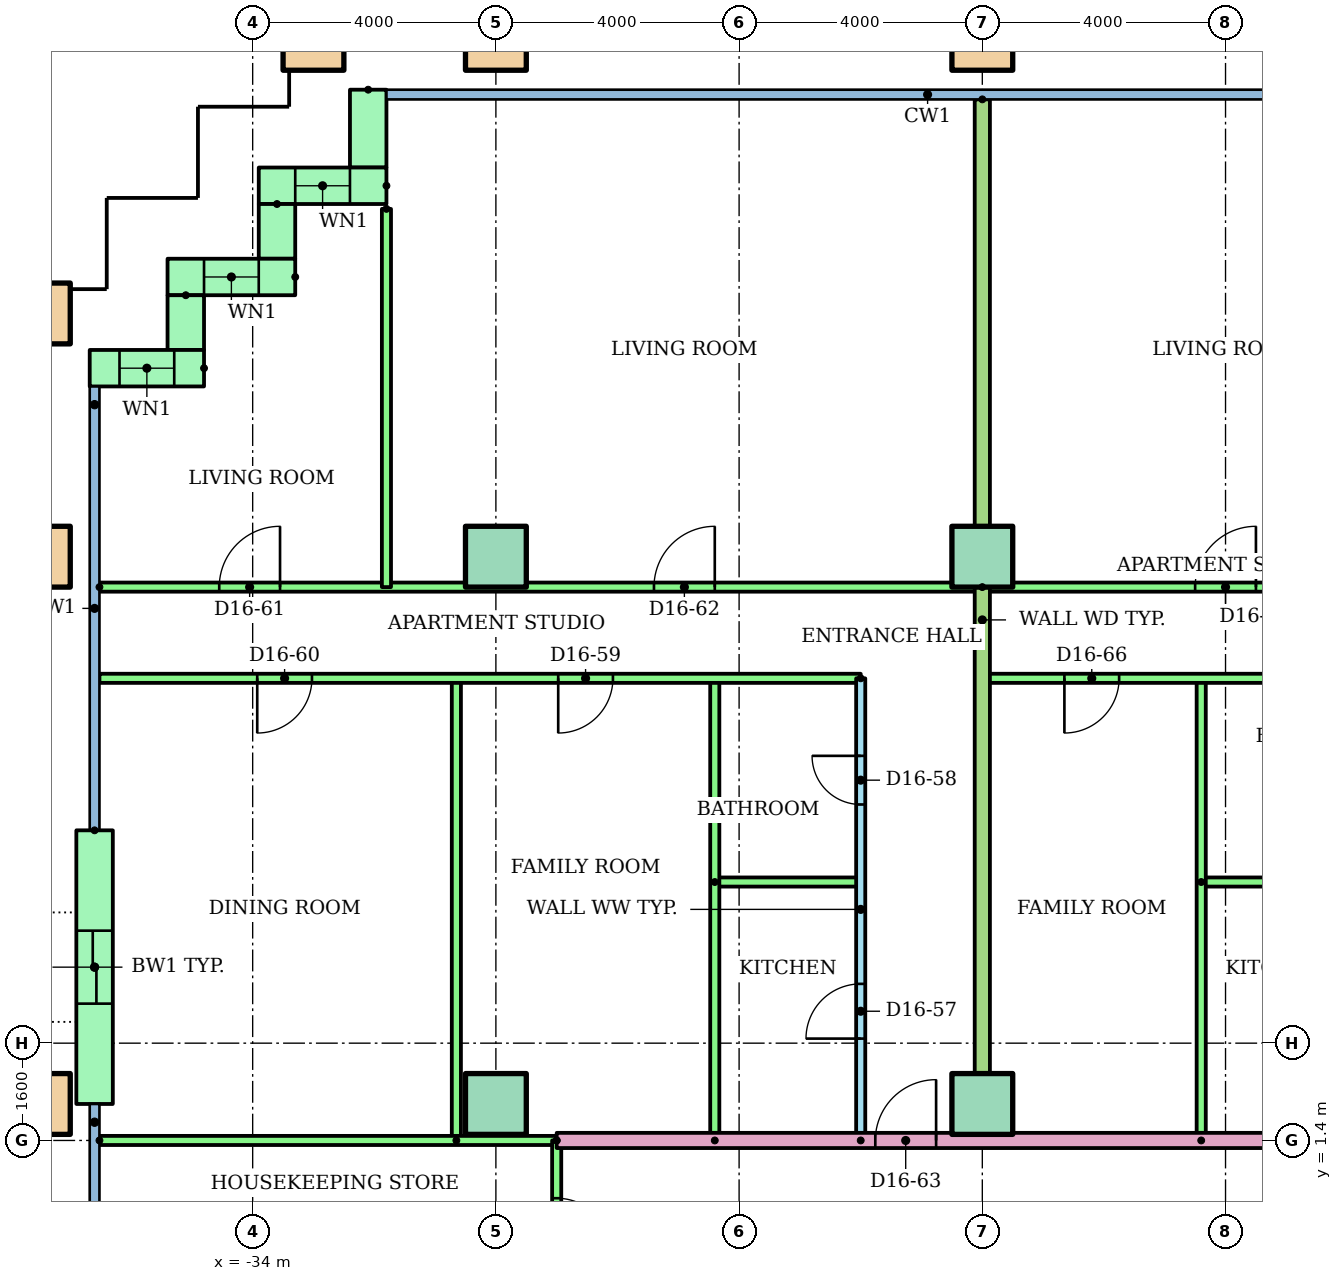
"""IFC4 building model, lengths in metres.
Left out: names, types, materials, properties, quantities, classifications, styles, units other than length and angle.
Written with IfcOpenShell. Run it as: python <this file> out.ifc"""

import sys

from ifc_helpers import new_model, si_unit, direction, frame, frame_2d, origin, origin_2d, place, context, subcontext, project, spatial, rectangle, hollow_rectangle, extrude, element, fill, save


model = new_model("IFC4")
c1 = context("Model", 3, precision=1e-05, world=origin(), true_north=direction((0.0, 1.0)))
c2 = subcontext(c1, "Body", "Model", "MODEL_VIEW")
j1 = project(units=[si_unit("LENGTHUNIT", "METRE"), si_unit("PLANEANGLEUNIT", "RADIAN")], contexts=[c1])
p1 = place(None, origin())
s1 = spatial("IfcSite", under=j1, at=p1, CompositionType="ELEMENT")
p2 = place(p1, origin())
s2 = spatial("IfcBuilding", under=s1, at=p2, CompositionType="ELEMENT")
p3 = place(p2, frame((0.0, 0.0, 60.8)))
s3 = spatial("IfcBuildingStorey", under=s2, at=p3, CompositionType="ELEMENT", Elevation=60.8)
p4 = place(p3, frame((-37.5, 2.0, 0.0)))
e1 = element("IfcColumn", 1, at=p4, inside=s3, PredefinedType="COLUMN", context=c2, shape_type="SweptSolid", body=[
    extrude(hollow_rectangle(XDim=1.0, YDim=1.0, WallThickness=0.05, at=origin_2d()), origin(), (0.0, 0.0, 1.0), 3.2),
])
for number, where in (
    (2, (-30.0, 2.0, 0.0)),
    (3, (-22.0, 2.0, 0.0)),
):
    element("IfcColumn", number, at=place(p3, frame(where)), inside=s3, PredefinedType="COLUMN", context=c2, shape_type="SweptSolid", body=[
        extrude(rectangle(XDim=1.0, YDim=1.0, at=origin_2d()), origin(), (0.0, 0.0, 1.0), 3.2),
    ])
p5 = place(p3, frame((-37.5, 11.0, 0.0)))
e4 = element("IfcColumn", 4, at=p5, inside=s3, PredefinedType="COLUMN", context=c2, shape_type="SweptSolid", body=[
    extrude(hollow_rectangle(XDim=1.0, YDim=1.0, WallThickness=0.05, at=origin_2d()), origin(), (0.0, 0.0, 1.0), 3.2),
])
for number, where in (
    (5, (-30.0, 11.0, 0.0)),
    (6, (-22.0, 11.0, 0.0)),
):
    element("IfcColumn", number, at=place(p3, frame(where)), inside=s3, PredefinedType="COLUMN", context=c2, shape_type="SweptSolid", body=[
        extrude(rectangle(XDim=1.0, YDim=1.0, at=origin_2d()), origin(), (0.0, 0.0, 1.0), 3.2),
    ])
for number, where in (
    (7, (-37.5, 15.0, 0.0)),
    (8, (-33.0, 19.5, 0.0)),
    (9, (-30.0, 19.5, 0.0)),
    (10, (-22.0, 19.5, 0.0)),
):
    element("IfcColumn", number, at=place(p3, frame(where)), inside=s3, PredefinedType="COLUMN", context=c2, shape_type="SweptSolid", body=[
        extrude(hollow_rectangle(XDim=1.0, YDim=1.0, WallThickness=0.05, at=origin_2d()), origin(), (0.0, 0.0, 1.0), 3.2),
    ])
p6 = place(p3, frame((-32.1, 18.68, 0.0), z_axis=(0.0, 0.0, 1.0), x_axis=(0.0, -1.0, 0.0)))
e11 = element("IfcWall", 11, at=p6, inside=s3, PredefinedType="STANDARD", context=c2, shape_type="SweptSolid", body=[
    extrude(rectangle(XDim=1.28, YDim=0.6, at=frame_2d((0.64, 0.0))), origin(), (0.0, 0.0, 1.0), 2.8),
])
p7 = place(p3, frame((-31.8, 17.1, 0.0), z_axis=(0.0, 0.0, 1.0), x_axis=(-1.0, 0.0, 0.0)))
e12 = element("IfcWall", 12, at=p7, inside=s3, PredefinedType="STANDARD", context=c2, shape_type="SweptSolid", body=[
    extrude(rectangle(XDim=2.1, YDim=0.6, at=frame_2d((1.05, 0.0))), origin(), (0.0, 0.0, 1.0), 2.8),
])
p8 = place(p7, frame((0.6, 0.0, 0.9)))
e13 = element("IfcOpeningElement", 13, at=p8, cuts=e12, PredefinedType="OPENING", context=c2, shape_type="SweptSolid", body=[
    extrude(rectangle(XDim=0.9, YDim=1.5, at=frame_2d((0.45, 0.75))), frame((0.0, 0.31, 0.0), z_axis=(0.0, -1.0, 0.0), x_axis=(1.0, 0.0, 0.0)), (0.0, 0.0, 1.0), 0.62),
])
p9 = place(p3, frame((-33.6, 16.8, 0.0), z_axis=(0.0, 0.0, 1.0), x_axis=(0.0, -1.0, 0.0)))
e14 = element("IfcWall", 14, at=p9, inside=s3, PredefinedType="STANDARD", context=c2, shape_type="SweptSolid", body=[
    extrude(rectangle(XDim=0.9, YDim=0.6, at=frame_2d((0.45, 0.0))), origin(), (0.0, 0.0, 1.0), 2.8),
])
p10 = place(p3, frame((-33.3, 15.6, 0.0), z_axis=(0.0, 0.0, 1.0), x_axis=(-1.0, 0.0, 0.0)))
e15 = element("IfcWall", 15, at=p10, inside=s3, PredefinedType="STANDARD", context=c2, shape_type="SweptSolid", body=[
    extrude(rectangle(XDim=2.1, YDim=0.6, at=frame_2d((1.05, 0.0))), origin(), (0.0, 0.0, 1.0), 2.8),
])
p11 = place(p10, frame((0.6, 0.0, 0.9)))
e16 = element("IfcOpeningElement", 16, at=p11, cuts=e15, PredefinedType="OPENING", context=c2, shape_type="SweptSolid", body=[
    extrude(rectangle(XDim=0.9, YDim=1.5, at=frame_2d((0.45, 0.75))), frame((0.0, 0.31, 0.0), z_axis=(0.0, -1.0, 0.0), x_axis=(1.0, 0.0, 0.0)), (0.0, 0.0, 1.0), 0.62),
])
p12 = place(p3, frame((-35.1, 15.3, 0.0), z_axis=(0.0, 0.0, 1.0), x_axis=(0.0, -1.0, 0.0)))
e17 = element("IfcWall", 17, at=p12, inside=s3, PredefinedType="STANDARD", context=c2, shape_type="SweptSolid", body=[
    extrude(rectangle(XDim=0.9, YDim=0.6, at=frame_2d((0.45, 0.0))), origin(), (0.0, 0.0, 1.0), 2.8),
])
p13 = place(p3, frame((-34.8, 14.1, 0.0), z_axis=(0.0, 0.0, 1.0), x_axis=(-1.0, 0.0, 0.0)))
e18 = element("IfcWall", 18, at=p13, inside=s3, PredefinedType="STANDARD", context=c2, shape_type="SweptSolid", body=[
    extrude(rectangle(XDim=1.88, YDim=0.6, at=frame_2d((0.94, 0.0))), origin(), (0.0, 0.0, 1.0), 2.8),
])
p14 = place(p13, frame((0.49, 0.0, 0.9)))
e19 = element("IfcOpeningElement", 19, at=p14, cuts=e18, PredefinedType="OPENING", context=c2, shape_type="SweptSolid", body=[
    extrude(rectangle(XDim=0.9, YDim=1.5, at=frame_2d((0.45, 0.75))), frame((0.0, 0.31, 0.0), z_axis=(0.0, -1.0, 0.0), x_axis=(1.0, 0.0, 0.0)), (0.0, 0.0, 1.0), 0.62),
])
p15 = place(p3, frame((-36.6, 6.5, 0.0), z_axis=(0.0, 0.0, 1.0), x_axis=(0.0, -1.0, 0.0)))
e20 = element("IfcWall", 20, at=p15, inside=s3, PredefinedType="STANDARD", context=c2, shape_type="SweptSolid", body=[
    extrude(rectangle(XDim=4.5, YDim=0.6, at=frame_2d((2.25, 0.0))), origin(), (0.0, 0.0, 1.0), 2.8),
])
p16 = place(p15, frame((1.65, 0.0, 0.0)))
e21 = element("IfcOpeningElement", 21, at=p16, cuts=e20, PredefinedType="OPENING", context=c2, shape_type="SweptSolid", body=[
    extrude(rectangle(XDim=1.2, YDim=2.1, at=frame_2d((0.6, 1.05))), frame((0.0, 0.31, 0.0), z_axis=(0.0, -1.0, 0.0), x_axis=(1.0, 0.0, 0.0)), (0.0, 0.0, 1.0), 0.62),
])
p17 = place(p3, frame((-24.0, 1.4, 0.0), z_axis=(0.0, 0.0, 1.0), x_axis=(0.0, 1.0, 0.0)))
e22 = element("IfcWall", 22, at=p17, inside=s3, PredefinedType="PARTITIONING", context=c2, shape_type="SweptSolid", body=[
    extrude(rectangle(XDim=7.6, YDim=0.15, at=frame_2d((3.8, 0.0))), origin(), (0.0, 0.0, 1.0), 2.4),
])
p18 = place(p17, frame((1.675, 0.0, 0.0)))
e23 = element("IfcOpeningElement", 23, at=p18, cuts=e22, PredefinedType="OPENING", context=c2, shape_type="SweptSolid", body=[
    extrude(rectangle(XDim=0.9, YDim=2.1, at=frame_2d((0.45, 1.05))), frame((0.0, 0.085, 0.0), z_axis=(0.0, -1.0, 0.0), x_axis=(1.0, 0.0, 0.0)), (0.0, 0.0, 1.0), 0.17),
])
p19 = place(p17, frame((5.525, 0.0, 0.0)))
e24 = element("IfcOpeningElement", 24, at=p19, cuts=e22, PredefinedType="OPENING", context=c2, shape_type="SweptSolid", body=[
    extrude(rectangle(XDim=0.8, YDim=2.1, at=frame_2d((0.4, 1.05))), frame((0.0, 0.085, 0.0), z_axis=(0.0, -1.0, 0.0), x_axis=(1.0, 0.0, 0.0)), (0.0, 0.0, 1.0), 0.17),
])
p20 = place(p3, frame((-26.4, 5.65, 0.0)))
e25 = element("IfcWall", 25, at=p20, inside=s3, PredefinedType="PARTITIONING", context=c2, shape_type="SweptSolid", body=[
    extrude(rectangle(XDim=2.4, YDim=0.15, at=frame_2d((1.2, 0.0))), origin(), (0.0, 0.0, 1.0), 2.4),
])
for number, where, z_axis, x_axis in (
    (26, (-26.4, 1.4, 0.0), (0.0, 0.0, 1.0), (0.0, 1.0, 0.0)),
    (27, (-30.65, 1.4, 0.0), (0.0, 0.0, 1.0), (0.0, 1.0, 0.0)),
):
    element("IfcWall", number, at=place(p3, frame(where, z_axis=z_axis, x_axis=x_axis)), inside=s3, PredefinedType="PARTITIONING", context=c2, shape_type="SweptSolid", body=[
        extrude(rectangle(XDim=7.6, YDim=0.15, at=frame_2d((3.8, 0.0))), origin(), (0.0, 0.0, 1.0), 2.4),
    ])
p21 = place(p3, frame((-24.0, 9.0, 0.0), z_axis=(0.0, 0.0, 1.0), x_axis=(-1.0, 0.0, 0.0)))
e28 = element("IfcWall", 28, at=p21, inside=s3, PredefinedType="PARTITIONING", context=c2, shape_type="SweptSolid", body=[
    extrude(rectangle(XDim=12.52, YDim=0.15, at=frame_2d((6.26, 0.0))), origin(), (0.0, 0.0, 1.0), 2.4),
])
p22 = place(p21, frame((4.075, 0.0, 0.0)))
e29 = element("IfcOpeningElement", 29, at=p22, cuts=e28, PredefinedType="OPENING", context=c2, shape_type="SweptSolid", body=[
    extrude(rectangle(XDim=0.9, YDim=2.1, at=frame_2d((0.45, 1.05))), frame((0.0, 0.085, 0.0), z_axis=(0.0, -1.0, 0.0), x_axis=(1.0, 0.0, 0.0)), (0.0, 0.0, 1.0), 0.17),
])
p23 = place(p21, frame((9.025, 0.0, 0.0)))
e30 = element("IfcOpeningElement", 30, at=p23, cuts=e28, PredefinedType="OPENING", context=c2, shape_type="SweptSolid", body=[
    extrude(rectangle(XDim=0.9, YDim=2.1, at=frame_2d((0.45, 1.05))), frame((0.0, 0.085, 0.0), z_axis=(0.0, -1.0, 0.0), x_axis=(1.0, 0.0, 0.0)), (0.0, 0.0, 1.0), 0.17),
])
p24 = place(p3, frame((-36.52, 10.5, 0.0)))
e31 = element("IfcWall", 31, at=p24, inside=s3, PredefinedType="PARTITIONING", context=c2, shape_type="SweptSolid", body=[
    extrude(rectangle(XDim=14.52, YDim=0.15, at=frame_2d((7.26, 0.0))), origin(), (0.0, 0.0, 1.0), 2.4),
])
p25 = place(p24, frame((1.97, 0.0, 0.0)))
e32 = element("IfcOpeningElement", 32, at=p25, cuts=e31, PredefinedType="OPENING", context=c2, shape_type="SweptSolid", body=[
    extrude(rectangle(XDim=1.0, YDim=2.1, at=frame_2d((0.5, 1.05))), frame((0.0, 0.085, 0.0), z_axis=(0.0, -1.0, 0.0), x_axis=(1.0, 0.0, 0.0)), (0.0, 0.0, 1.0), 0.17),
])
p26 = place(p24, frame((9.12, 0.0, 0.0)))
e33 = element("IfcOpeningElement", 33, at=p26, cuts=e31, PredefinedType="OPENING", context=c2, shape_type="SweptSolid", body=[
    extrude(rectangle(XDim=1.0, YDim=2.1, at=frame_2d((0.5, 1.05))), frame((0.0, 0.085, 0.0), z_axis=(0.0, -1.0, 0.0), x_axis=(1.0, 0.0, 0.0)), (0.0, 0.0, 1.0), 0.17),
])
p27 = place(p3, frame((-31.8, 16.72, 0.0), z_axis=(0.0, 0.0, 1.0), x_axis=(0.0, -1.0, 0.0)))
e34 = element("IfcWall", 34, at=p27, inside=s3, PredefinedType="PARTITIONING", context=c2, shape_type="SweptSolid", body=[
    extrude(rectangle(XDim=6.22, YDim=0.15, at=frame_2d((3.11, 0.0))), origin(), (0.0, 0.0, 1.0), 2.4),
])
p28 = place(p3, frame((-18.4, 5.65, 0.0)))
e35 = element("IfcWall", 35, at=p28, inside=s3, PredefinedType="PARTITIONING", context=c2, shape_type="SweptSolid", body=[
    extrude(rectangle(XDim=2.4, YDim=0.15, at=frame_2d((1.2, 0.0))), origin(), (0.0, 0.0, 1.0), 2.4),
])
p29 = place(p3, frame((-18.4, 1.4, 0.0), z_axis=(0.0, 0.0, 1.0), x_axis=(0.0, 1.0, 0.0)))
e36 = element("IfcWall", 36, at=p29, inside=s3, PredefinedType="PARTITIONING", context=c2, shape_type="SweptSolid", body=[
    extrude(rectangle(XDim=7.6, YDim=0.15, at=frame_2d((3.8, 0.0))), origin(), (0.0, 0.0, 1.0), 2.4),
])
p30 = place(p3, frame((-16.0, 9.0, 0.0), z_axis=(0.0, 0.0, 1.0), x_axis=(-1.0, 0.0, 0.0)))
e37 = element("IfcWall", 37, at=p30, inside=s3, PredefinedType="PARTITIONING", context=c2, shape_type="SweptSolid", body=[
    extrude(rectangle(XDim=6.0, YDim=0.15, at=frame_2d((3.0, 0.0))), origin(), (0.0, 0.0, 1.0), 2.4),
])
p31 = place(p30, frame((3.75, 0.0, 0.0)))
e38 = element("IfcOpeningElement", 38, at=p31, cuts=e37, PredefinedType="OPENING", context=c2, shape_type="SweptSolid", body=[
    extrude(rectangle(XDim=0.9, YDim=2.1, at=frame_2d((0.45, 1.05))), frame((0.0, 0.085, 0.0), z_axis=(0.0, -1.0, 0.0), x_axis=(1.0, 0.0, 0.0)), (0.0, 0.0, 1.0), 0.17),
])
p32 = place(p3, frame((-22.0, 10.5, 0.0)))
e39 = element("IfcWall", 39, at=p32, inside=s3, PredefinedType="PARTITIONING", context=c2, shape_type="SweptSolid", body=[
    extrude(rectangle(XDim=8.0, YDim=0.15, at=frame_2d((4.0, 0.0))), origin(), (0.0, 0.0, 1.0), 2.4),
])
p33 = place(p32, frame((3.5, 0.0, 0.0)))
e40 = element("IfcOpeningElement", 40, at=p33, cuts=e39, PredefinedType="OPENING", context=c2, shape_type="SweptSolid", body=[
    extrude(rectangle(XDim=1.0, YDim=2.1, at=frame_2d((0.5, 1.05))), frame((0.0, 0.085, 0.0), z_axis=(0.0, -1.0, 0.0), x_axis=(1.0, 0.0, 0.0)), (0.0, 0.0, 1.0), 0.17),
])
p34 = place(p3, frame((-22.0, 18.521, 0.0), z_axis=(0.0, 0.0, 1.0), x_axis=(0.0, -1.0, 0.0)))
e41 = element("IfcWall", 41, at=p34, inside=s3, PredefinedType="PARTITIONING", context=c2, shape_type="SweptSolid", body=[
    extrude(rectangle(XDim=17.121, YDim=0.25, at=frame_2d((8.561, 0.0))), origin(), (0.0, 0.0, 1.0), 2.4),
])
p35 = place(p3, frame((-29.0, 1.4, 0.0)))
e42 = element("IfcWall", 42, at=p35, inside=s3, PredefinedType="PARTITIONING", context=c2, shape_type="SweptSolid", body=[
    extrude(rectangle(XDim=15.0, YDim=0.25, at=frame_2d((7.5, 0.0))), origin(), (0.0, 0.0, 1.0), 2.4),
])
p36 = place(p35, frame((5.24, 0.0, 0.0)))
e43 = element("IfcOpeningElement", 43, at=p36, cuts=e42, PredefinedType="OPENING", context=c2, shape_type="SweptSolid", body=[
    extrude(rectangle(XDim=1.0, YDim=2.1, at=frame_2d((0.5, 1.05))), frame((0.0, 0.135, 0.0), z_axis=(0.0, -1.0, 0.0), x_axis=(1.0, 0.0, 0.0)), (0.0, 0.0, 1.0), 0.27),
])
p37 = place(p35, frame((13.5, 0.0, 0.0)))
e44 = element("IfcOpeningElement", 44, at=p37, cuts=e42, PredefinedType="OPENING", context=c2, shape_type="SweptSolid", body=[
    extrude(rectangle(XDim=1.0, YDim=2.1, at=frame_2d((0.5, 1.05))), frame((0.0, 0.135, 0.0), z_axis=(0.0, -1.0, 0.0), x_axis=(1.0, 0.0, 0.0)), (0.0, 0.0, 1.0), 0.27),
])
p38 = place(p3, frame((-36.52, 1.4, 0.0)))
e45 = element("IfcWall", 45, at=p38, inside=s3, PredefinedType="PARTITIONING", context=c2, shape_type="SweptSolid", body=[
    extrude(rectangle(XDim=7.52, YDim=0.15, at=frame_2d((3.76, 0.0))), origin(), (0.0, 0.0, 1.0), 2.4),
])
p39 = place(p3, frame((-29.0, 1.4, 0.0), z_axis=(0.0, 0.0, 1.0), x_axis=(0.0, -1.0, 0.0)))
e46 = element("IfcWall", 46, at=p39, inside=s3, PredefinedType="PARTITIONING", context=c2, shape_type="SweptSolid", body=[
    extrude(rectangle(XDim=2.8, YDim=0.15, at=frame_2d((1.4, 0.0))), origin(), (0.0, 0.0, 1.0), 2.4),
])
p40 = place(p39, frame((0.95, 0.0, 0.0)))
e47 = element("IfcOpeningElement", 47, at=p40, cuts=e46, PredefinedType="OPENING", context=c2, shape_type="SweptSolid", body=[
    extrude(rectangle(XDim=0.9, YDim=2.1, at=frame_2d((0.45, 1.05))), frame((0.0, 0.085, 0.0), z_axis=(0.0, -1.0, 0.0), x_axis=(1.0, 0.0, 0.0)), (0.0, 0.0, 1.0), 0.17),
])
p41 = place(p8, origin())
e48 = element("IfcWindow", 48, at=p41, inside=s3, PartitioningType="SINGLE_PANEL", PredefinedType="WINDOW", context=c2, shape_type="SweptSolid", body=[
    extrude(rectangle(XDim=0.9, YDim=1.5, at=frame_2d((0.45, 0.75))), frame((0.0, 0.03, 0.0), z_axis=(0.0, -1.0, 0.0), x_axis=(1.0, 0.0, 0.0)), (0.0, 0.0, 1.0), 0.06),
])
fill(e13, e48)
p42 = place(p11, origin())
e49 = element("IfcWindow", 49, at=p42, inside=s3, PartitioningType="SINGLE_PANEL", PredefinedType="WINDOW", context=c2, shape_type="SweptSolid", body=[
    extrude(rectangle(XDim=0.9, YDim=1.5, at=frame_2d((0.45, 0.75))), frame((0.0, 0.03, 0.0), z_axis=(0.0, -1.0, 0.0), x_axis=(1.0, 0.0, 0.0)), (0.0, 0.0, 1.0), 0.06),
])
fill(e16, e49)
p43 = place(p14, origin())
e50 = element("IfcWindow", 50, at=p43, inside=s3, PartitioningType="SINGLE_PANEL", PredefinedType="WINDOW", context=c2, shape_type="SweptSolid", body=[
    extrude(rectangle(XDim=0.9, YDim=1.5, at=frame_2d((0.45, 0.75))), frame((0.0, 0.03, 0.0), z_axis=(0.0, -1.0, 0.0), x_axis=(1.0, 0.0, 0.0)), (0.0, 0.0, 1.0), 0.06),
])
fill(e19, e50)
p44 = place(p18, origin())
e51 = element("IfcDoor", 51, at=p44, inside=s3, OperationType="SINGLE_SWING_LEFT", PredefinedType="DOOR", context=c2, shape_type="SweptSolid", body=[
    extrude(rectangle(XDim=0.9, YDim=2.1, at=frame_2d((0.45, 1.05))), frame((0.0, 0.025, 0.0), z_axis=(0.0, -1.0, 0.0), x_axis=(1.0, 0.0, 0.0)), (0.0, 0.0, 1.0), 0.05),
])
fill(e23, e51)
p45 = place(p19, origin())
e52 = element("IfcDoor", 52, at=p45, inside=s3, OperationType="SINGLE_SWING_RIGHT", PredefinedType="DOOR", context=c2, shape_type="SweptSolid", body=[
    extrude(rectangle(XDim=0.8, YDim=2.1, at=frame_2d((0.4, 1.05))), frame((0.0, 0.025, 0.0), z_axis=(0.0, -1.0, 0.0), x_axis=(1.0, 0.0, 0.0)), (0.0, 0.0, 1.0), 0.05),
])
fill(e24, e52)
p46 = place(p22, origin())
e53 = element("IfcDoor", 53, at=p46, inside=s3, OperationType="SINGLE_SWING_RIGHT", PredefinedType="DOOR", context=c2, shape_type="SweptSolid", body=[
    extrude(rectangle(XDim=0.9, YDim=2.1, at=frame_2d((0.45, 1.05))), frame((0.0, 0.025, 0.0), z_axis=(0.0, -1.0, 0.0), x_axis=(1.0, 0.0, 0.0)), (0.0, 0.0, 1.0), 0.05),
])
fill(e29, e53)
p47 = place(p23, origin())
e54 = element("IfcDoor", 54, at=p47, inside=s3, OperationType="SINGLE_SWING_RIGHT", PredefinedType="DOOR", context=c2, shape_type="SweptSolid", body=[
    extrude(rectangle(XDim=0.9, YDim=2.1, at=frame_2d((0.45, 1.05))), frame((0.0, 0.025, 0.0), z_axis=(0.0, -1.0, 0.0), x_axis=(1.0, 0.0, 0.0)), (0.0, 0.0, 1.0), 0.05),
])
fill(e30, e54)
p48 = place(p25, origin())
e55 = element("IfcDoor", 55, at=p48, inside=s3, OperationType="SINGLE_SWING_RIGHT", PredefinedType="DOOR", context=c2, shape_type="SweptSolid", body=[
    extrude(rectangle(XDim=1.0, YDim=2.1, at=frame_2d((0.5, 1.05))), frame((0.0, 0.025, 0.0), z_axis=(0.0, -1.0, 0.0), x_axis=(1.0, 0.0, 0.0)), (0.0, 0.0, 1.0), 0.05),
])
fill(e32, e55)
p49 = place(p26, origin())
e56 = element("IfcDoor", 56, at=p49, inside=s3, OperationType="SINGLE_SWING_RIGHT", PredefinedType="DOOR", context=c2, shape_type="SweptSolid", body=[
    extrude(rectangle(XDim=1.0, YDim=2.1, at=frame_2d((0.5, 1.05))), frame((0.0, 0.025, 0.0), z_axis=(0.0, -1.0, 0.0), x_axis=(1.0, 0.0, 0.0)), (0.0, 0.0, 1.0), 0.05),
])
fill(e33, e56)
p50 = place(p36, origin())
e57 = element("IfcDoor", 57, at=p50, inside=s3, OperationType="SINGLE_SWING_RIGHT", PredefinedType="DOOR", context=c2, shape_type="SweptSolid", body=[
    extrude(rectangle(XDim=1.0, YDim=2.1, at=frame_2d((0.5, 1.05))), frame((0.0, 0.025, 0.0), z_axis=(0.0, -1.0, 0.0), x_axis=(1.0, 0.0, 0.0)), (0.0, 0.0, 1.0), 0.05),
])
fill(e43, e57)
p51 = place(p31, origin())
e58 = element("IfcDoor", 58, at=p51, inside=s3, OperationType="SINGLE_SWING_RIGHT", PredefinedType="DOOR", context=c2, shape_type="SweptSolid", body=[
    extrude(rectangle(XDim=0.9, YDim=2.1, at=frame_2d((0.45, 1.05))), frame((0.0, 0.025, 0.0), z_axis=(0.0, -1.0, 0.0), x_axis=(1.0, 0.0, 0.0)), (0.0, 0.0, 1.0), 0.05),
])
fill(e38, e58)
p52 = place(p33, origin())
e59 = element("IfcDoor", 59, at=p52, inside=s3, OperationType="SINGLE_SWING_RIGHT", PredefinedType="DOOR", context=c2, shape_type="SweptSolid", body=[
    extrude(rectangle(XDim=1.0, YDim=2.1, at=frame_2d((0.5, 1.05))), frame((0.0, 0.025, 0.0), z_axis=(0.0, -1.0, 0.0), x_axis=(1.0, 0.0, 0.0)), (0.0, 0.0, 1.0), 0.05),
])
fill(e40, e59)
p53 = place(p40, origin())
e60 = element("IfcDoor", 60, at=p53, inside=s3, OperationType="SINGLE_SWING_RIGHT", PredefinedType="DOOR", context=c2, shape_type="SweptSolid", body=[
    extrude(rectangle(XDim=0.9, YDim=2.1, at=frame_2d((0.45, 1.05))), frame((0.0, 0.025, 0.0), z_axis=(0.0, -1.0, 0.0), x_axis=(1.0, 0.0, 0.0)), (0.0, 0.0, 1.0), 0.05),
])
fill(e47, e60)
p54 = place(p16, origin())
e61 = element("IfcDoor", 61, at=p54, inside=s3, OperationType="SLIDING_TO_LEFT", PredefinedType="DOOR", context=c2, shape_type="SweptSolid", body=[
    extrude(rectangle(XDim=1.2, YDim=2.1, at=frame_2d((0.6, 1.05))), frame((0.0, 0.025, 0.0), z_axis=(0.0, -1.0, 0.0), x_axis=(1.0, 0.0, 0.0)), (0.0, 0.0, 1.0), 0.05),
])
fill(e21, e61)
save(model, sys.argv[1])
